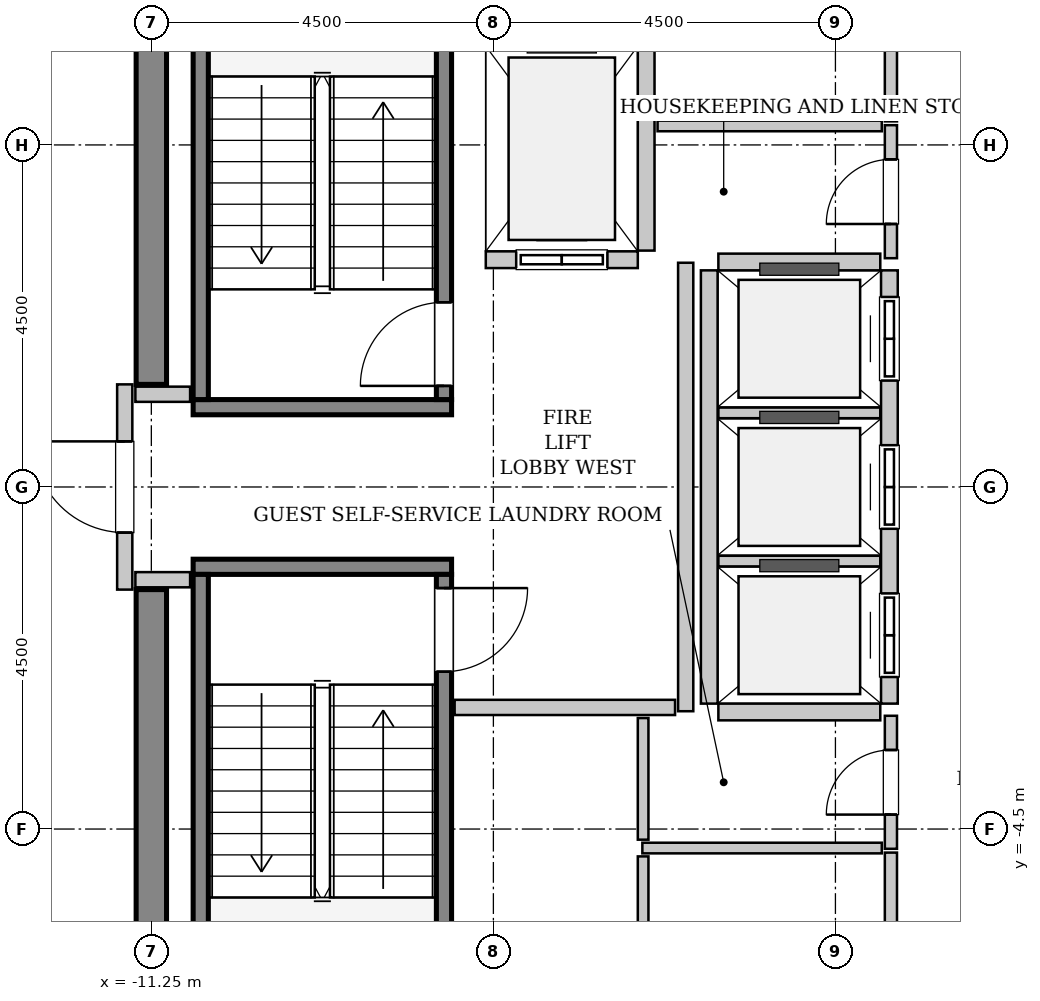
"""IFC4 building model, lengths in metres.
Left out: names, types, materials, properties, quantities, classifications, styles, units other than length and angle.
Written with IfcOpenShell. Run it as: python <this file> out.ifc"""

import sys

from ifc_helpers import new_model, si_unit, direction, frame, frame_2d, origin, place, context, subcontext, project, spatial, rectangle, extrude, source, transform, mapped, element, fill, save


model = new_model("IFC4")
c1 = context("Model", 3, precision=1e-05, world=origin(), true_north=direction((0.0, 1.0)))
c2 = subcontext(c1, "Body", "Model", "MODEL_VIEW")
j1 = project(units=[si_unit("LENGTHUNIT", "METRE"), si_unit("PLANEANGLEUNIT", "RADIAN")], contexts=[c1])
p1 = place(None, origin())
s1 = spatial("IfcSite", under=j1, at=p1, CompositionType="ELEMENT")
p2 = place(p1, origin())
s2 = spatial("IfcBuilding", under=s1, at=p2, CompositionType="ELEMENT")
p3 = place(p2, frame((0.0, 0.0, 330.0)))
s3 = spatial("IfcBuildingStorey", under=s2, at=p3, CompositionType="ELEMENT", Elevation=330.0)
m1 = source(origin(), c2, "Body", "SweptSolid", [
    extrude(rectangle(XDim=7.45, YDim=0.4, at=frame_2d((3.725, 0.0))), origin(), (0.0, 0.0, 1.0), 3.8),
])
for number, where, z_axis, x_axis in (
    (1, (-11.25, -8.8, 0.0), (0.0, 0.0, 1.0), (0.0, 1.0, 0.0)),
    (2, (-11.25, 1.35, 0.0), (0.0, 0.0, 1.0), (0.0, 1.0, 0.0)),
):
    element("IfcWall", number, at=place(p3, frame(where, z_axis=z_axis, x_axis=x_axis)), inside=s3, PredefinedType="SHEAR", context=c2, shape_type="MappedRepresentation", body=[
        mapped(m1, transform((0.0, 0.0, 0.0), x_axis=(1.0, 0.0, 0.0), y_axis=(0.0, 1.0, 0.0), z_axis=(0.0, 0.0, 1.0), scale=1.0)),
    ])
m2 = source(origin(), c2, "Body", "SweptSolid", [
    extrude(rectangle(XDim=3.4, YDim=0.2, at=frame_2d((1.7, 0.0))), origin(), (0.0, 0.0, 1.0), 3.8),
])
p4 = place(p3, frame((-7.3, 1.05, 0.0), z_axis=(0.0, 0.0, 1.0), x_axis=(-1.0, 0.0, 0.0)))
e3 = element("IfcWall", 3, at=p4, inside=s3, PredefinedType="SOLIDWALL", context=c2, shape_type="MappedRepresentation", body=[
    mapped(m2, transform((0.0, 0.0, 0.0), x_axis=(1.0, 0.0, 0.0), y_axis=(0.0, 1.0, 0.0), z_axis=(0.0, 0.0, 1.0), scale=1.0)),
])
m3 = source(origin(), c2, "Body", "SweptSolid", [
    extrude(rectangle(XDim=7.1, YDim=0.2, at=frame_2d((3.55, 0.0))), origin(), (0.0, 0.0, 1.0), 3.8),
])
p5 = place(p3, frame((-7.4, 1.15, 0.0), z_axis=(0.0, 0.0, 1.0), x_axis=(0.0, 1.0, 0.0)))
e4 = element("IfcWall", 4, at=p5, inside=s3, PredefinedType="SOLIDWALL", context=c2, shape_type="MappedRepresentation", body=[
    mapped(m3, transform((0.0, 0.0, 0.0), x_axis=(1.0, 0.0, 0.0), y_axis=(0.0, 1.0, 0.0), z_axis=(0.0, 0.0, 1.0), scale=1.0)),
])
p6 = place(p5, frame((0.18, 0.0, 0.0)))
e5 = element("IfcOpeningElement", 5, at=p6, cuts=e4, PredefinedType="OPENING", context=c2, shape_type="SweptSolid", body=[
    extrude(rectangle(XDim=1.1, YDim=2.15, at=frame_2d((0.55, 1.075))), frame((0.0, 0.11, 0.0), z_axis=(0.0, -1.0, 0.0), x_axis=(1.0, 0.0, 0.0)), (0.0, 0.0, 1.0), 0.22),
])
p7 = place(p3, frame((-10.6, 1.15, 0.0), z_axis=(0.0, 0.0, 1.0), x_axis=(0.0, 1.0, 0.0)))
e6 = element("IfcWall", 6, at=p7, inside=s3, PredefinedType="SOLIDWALL", context=c2, shape_type="MappedRepresentation", body=[
    mapped(m3, transform((0.0, 0.0, 0.0), x_axis=(1.0, 0.0, 0.0), y_axis=(0.0, 1.0, 0.0), z_axis=(0.0, 0.0, 1.0), scale=1.0)),
])
p8 = place(p3, frame((-10.7, -1.05, 0.0), z_axis=(0.0, 0.0, 1.0), x_axis=(1.0, 0.0, 0.0)))
e7 = element("IfcWall", 7, at=p8, inside=s3, PredefinedType="SOLIDWALL", context=c2, shape_type="MappedRepresentation", body=[
    mapped(m2, transform((0.0, 0.0, 0.0), x_axis=(1.0, 0.0, 0.0), y_axis=(0.0, 1.0, 0.0), z_axis=(0.0, 0.0, 1.0), scale=1.0)),
])
p9 = place(p3, frame((-10.6, -1.15, 0.0), z_axis=(0.0, 0.0, 1.0), x_axis=(0.0, -1.0, 0.0)))
e8 = element("IfcWall", 8, at=p9, inside=s3, PredefinedType="SOLIDWALL", context=c2, shape_type="MappedRepresentation", body=[
    mapped(m3, transform((0.0, 0.0, 0.0), x_axis=(1.0, 0.0, 0.0), y_axis=(0.0, 1.0, 0.0), z_axis=(0.0, 0.0, 1.0), scale=1.0)),
])
p10 = place(p3, frame((-7.4, -1.15, 0.0), z_axis=(0.0, 0.0, 1.0), x_axis=(0.0, -1.0, 0.0)))
e9 = element("IfcWall", 9, at=p10, inside=s3, PredefinedType="SOLIDWALL", context=c2, shape_type="MappedRepresentation", body=[
    mapped(m3, transform((0.0, 0.0, 0.0), x_axis=(1.0, 0.0, 0.0), y_axis=(0.0, 1.0, 0.0), z_axis=(0.0, 0.0, 1.0), scale=1.0)),
])
p11 = place(p10, frame((0.18, 0.0, 0.0)))
e10 = element("IfcOpeningElement", 10, at=p11, cuts=e9, PredefinedType="OPENING", context=c2, shape_type="SweptSolid", body=[
    extrude(rectangle(XDim=1.1, YDim=2.15, at=frame_2d((0.55, 1.075))), frame((0.0, 0.11, 0.0), z_axis=(0.0, -1.0, 0.0), x_axis=(1.0, 0.0, 0.0)), (0.0, 0.0, 1.0), 0.22),
])
m4 = source(origin(), c2, "Body", "SweptSolid", [
    extrude(rectangle(XDim=2.0, YDim=0.22, at=frame_2d((1.0, 0.0))), origin(), (0.0, 0.0, 1.0), 3.535),
])
p12 = place(p3, frame((-6.85, 2.99, 0.0), z_axis=(0.0, 0.0, 1.0), x_axis=(1.0, 0.0, 0.0)))
e11 = element("IfcWall", 11, at=p12, inside=s3, PredefinedType="SOLIDWALL", context=c2, shape_type="MappedRepresentation", body=[
    mapped(m4, transform((0.0, 0.0, 0.0), x_axis=(1.0, 0.0, 0.0), y_axis=(0.0, 1.0, 0.0), z_axis=(0.0, 0.0, 1.0), scale=1.0)),
])
p13 = place(p12, frame((0.4, 0.0, 0.0)))
e12 = element("IfcOpeningElement", 12, at=p13, cuts=e11, PredefinedType="OPENING", context=c2, shape_type="SweptSolid", body=[
    extrude(rectangle(XDim=1.2, YDim=2.2, at=frame_2d((0.6, 1.1))), frame((0.0, 0.12, 0.0), z_axis=(0.0, -1.0, 0.0), x_axis=(1.0, 0.0, 0.0)), (0.0, 0.0, 1.0), 0.24),
])
m5 = source(origin(), c2, "Body", "SweptSolid", [
    extrude(rectangle(XDim=2.68, YDim=0.22, at=frame_2d((1.34, 0.0))), origin(), (0.0, 0.0, 1.0), 3.535),
])
p14 = place(p3, frame((-4.74, 3.11, 0.0), z_axis=(0.0, 0.0, 1.0), x_axis=(0.0, 1.0, 0.0)))
e13 = element("IfcWall", 13, at=p14, inside=s3, PredefinedType="SOLIDWALL", context=c2, shape_type="MappedRepresentation", body=[
    mapped(m5, transform((0.0, 0.0, 0.0), x_axis=(1.0, 0.0, 0.0), y_axis=(0.0, 1.0, 0.0), z_axis=(0.0, 0.0, 1.0), scale=1.0)),
])
m6 = source(origin(), c2, "Body", "SweptSolid", [
    extrude(rectangle(XDim=5.7, YDim=0.22, at=frame_2d((2.85, 0.0))), origin(), (0.0, 0.0, 1.0), 3.535),
])
p15 = place(p3, frame((-1.54, -2.85, 0.0), z_axis=(0.0, 0.0, 1.0), x_axis=(0.0, 1.0, 0.0)))
e14 = element("IfcWall", 14, at=p15, inside=s3, PredefinedType="SOLIDWALL", context=c2, shape_type="MappedRepresentation", body=[
    mapped(m6, transform((0.0, 0.0, 0.0), x_axis=(1.0, 0.0, 0.0), y_axis=(0.0, 1.0, 0.0), z_axis=(0.0, 0.0, 1.0), scale=1.0)),
])
p16 = place(p15, frame((0.35, 0.0, 0.0)))
e15 = element("IfcOpeningElement", 15, at=p16, cuts=e14, PredefinedType="OPENING", context=c2, shape_type="SweptSolid", body=[
    extrude(rectangle(XDim=1.1, YDim=2.2, at=frame_2d((0.55, 1.1))), frame((0.0, 0.12, 0.0), z_axis=(0.0, -1.0, 0.0), x_axis=(1.0, 0.0, 0.0)), (0.0, 0.0, 1.0), 0.24),
])
p17 = place(p15, frame((2.3, 0.0, 0.0)))
e16 = element("IfcOpeningElement", 16, at=p17, cuts=e14, PredefinedType="OPENING", context=c2, shape_type="SweptSolid", body=[
    extrude(rectangle(XDim=1.1, YDim=2.2, at=frame_2d((0.55, 1.1))), frame((0.0, 0.12, 0.0), z_axis=(0.0, -1.0, 0.0), x_axis=(1.0, 0.0, 0.0)), (0.0, 0.0, 1.0), 0.24),
])
p18 = place(p15, frame((4.25, 0.0, 0.0)))
e17 = element("IfcOpeningElement", 17, at=p18, cuts=e14, PredefinedType="OPENING", context=c2, shape_type="SweptSolid", body=[
    extrude(rectangle(XDim=1.1, YDim=2.2, at=frame_2d((0.55, 1.1))), frame((0.0, 0.12, 0.0), z_axis=(0.0, -1.0, 0.0), x_axis=(1.0, 0.0, 0.0)), (0.0, 0.0, 1.0), 0.24),
])
p19 = place(p3, frame((-3.91, 2.85, 0.0), z_axis=(0.0, 0.0, 1.0), x_axis=(0.0, -1.0, 0.0)))
e18 = element("IfcWall", 18, at=p19, inside=s3, PredefinedType="SOLIDWALL", context=c2, shape_type="MappedRepresentation", body=[
    mapped(m6, transform((0.0, 0.0, 0.0), x_axis=(1.0, 0.0, 0.0), y_axis=(0.0, 1.0, 0.0), z_axis=(0.0, 0.0, 1.0), scale=1.0)),
])
m7 = source(origin(), c2, "Body", "SweptSolid", [
    extrude(rectangle(XDim=2.13, YDim=0.22, at=frame_2d((1.065, 0.0))), origin(), (0.0, 0.0, 1.0), 3.535),
])
p20 = place(p3, frame((-3.79, -2.96, 0.0), z_axis=(0.0, 0.0, 1.0), x_axis=(1.0, 0.0, 0.0)))
e19 = element("IfcWall", 19, at=p20, inside=s3, PredefinedType="SOLIDWALL", context=c2, shape_type="MappedRepresentation", body=[
    mapped(m7, transform((0.0, 0.0, 0.0), x_axis=(1.0, 0.0, 0.0), y_axis=(0.0, 1.0, 0.0), z_axis=(0.0, 0.0, 1.0), scale=1.0)),
])
m8 = source(origin(), c2, "Body", "SweptSolid", [
    extrude(rectangle(XDim=2.13, YDim=0.14, at=frame_2d((1.065, 0.0))), origin(), (0.0, 0.0, 1.0), 3.535),
])
for number, where, z_axis, x_axis in (
    (20, (-3.79, -0.975, 0.0), (0.0, 0.0, 1.0), (1.0, 0.0, 0.0)),
    (21, (-3.79, 0.975, 0.0), (0.0, 0.0, 1.0), (1.0, 0.0, 0.0)),
):
    element("IfcWall", number, at=place(p3, frame(where, z_axis=z_axis, x_axis=x_axis)), inside=s3, PredefinedType="PARTITIONING", context=c2, shape_type="MappedRepresentation", body=[
        mapped(m8, transform((0.0, 0.0, 0.0), x_axis=(1.0, 0.0, 0.0), y_axis=(0.0, 1.0, 0.0), z_axis=(0.0, 0.0, 1.0), scale=1.0)),
    ])
p21 = place(p3, frame((-1.66, 2.96, 0.0), z_axis=(0.0, 0.0, 1.0), x_axis=(-1.0, 0.0, 0.0)))
e22 = element("IfcWall", 22, at=p21, inside=s3, PredefinedType="SOLIDWALL", context=c2, shape_type="MappedRepresentation", body=[
    mapped(m7, transform((0.0, 0.0, 0.0), x_axis=(1.0, 0.0, 0.0), y_axis=(0.0, 1.0, 0.0), z_axis=(0.0, 0.0, 1.0), scale=1.0)),
])
m9 = source(origin(), c2, "Body", "SweptSolid", [
    extrude(rectangle(XDim=2.7, YDim=0.2, at=frame_2d((1.35, 0.0))), origin(), (0.0, 0.0, 1.0), 2.625),
])
p22 = place(p3, frame((-11.6, -1.35, 0.0), z_axis=(0.0, 0.0, 1.0), x_axis=(0.0, 1.0, 0.0)))
e23 = element("IfcWall", 23, at=p22, inside=s3, PredefinedType="PARTITIONING", context=c2, shape_type="MappedRepresentation", body=[
    mapped(m9, transform((0.0, 0.0, 0.0), x_axis=(1.0, 0.0, 0.0), y_axis=(0.0, 1.0, 0.0), z_axis=(0.0, 0.0, 1.0), scale=1.0)),
])
p23 = place(p22, frame((0.75, 0.0, 0.0)))
e24 = element("IfcOpeningElement", 24, at=p23, cuts=e23, PredefinedType="OPENING", context=c2, shape_type="SweptSolid", body=[
    extrude(rectangle(XDim=1.2, YDim=2.15, at=frame_2d((0.6, 1.075))), frame((0.0, 0.11, 0.0), z_axis=(0.0, -1.0, 0.0), x_axis=(1.0, 0.0, 0.0)), (0.0, 0.0, 1.0), 0.22),
])
m10 = source(origin(), c2, "Body", "SweptSolid", [
    extrude(rectangle(XDim=5.9, YDim=0.2, at=frame_2d((2.95, 0.0))), origin(), (0.0, 0.0, 1.0), 3.535),
])
p24 = place(p3, frame((-4.22, -2.95, 0.0), z_axis=(0.0, 0.0, 1.0), x_axis=(0.0, 1.0, 0.0)))
e25 = element("IfcWall", 25, at=p24, inside=s3, PredefinedType="PARTITIONING", context=c2, shape_type="MappedRepresentation", body=[
    mapped(m10, transform((0.0, 0.0, 0.0), x_axis=(1.0, 0.0, 0.0), y_axis=(0.0, 1.0, 0.0), z_axis=(0.0, 0.0, 1.0), scale=1.0)),
])
m11 = source(origin(), c2, "Body", "SweptSolid", [
    extrude(rectangle(XDim=2.9, YDim=0.2, at=frame_2d((1.45, 0.0))), origin(), (0.0, 0.0, 1.0), 3.535),
])
p25 = place(p3, frame((-7.26, -2.9, 0.0), z_axis=(0.0, 0.0, 1.0), x_axis=(1.0, 0.0, 0.0)))
e26 = element("IfcWall", 26, at=p25, inside=s3, PredefinedType="PARTITIONING", context=c2, shape_type="MappedRepresentation", body=[
    mapped(m11, transform((0.0, 0.0, 0.0), x_axis=(1.0, 0.0, 0.0), y_axis=(0.0, 1.0, 0.0), z_axis=(0.0, 0.0, 1.0), scale=1.0)),
])
m12 = source(origin(), c2, "Body", "SweptSolid", [
    extrude(rectangle(XDim=0.72, YDim=0.2, at=frame_2d((0.36, 0.0))), origin(), (0.0, 0.0, 1.0), 3.535),
])
for number, where, z_axis, x_axis in (
    (27, (-11.46, 1.22, 0.0), (0.0, 0.0, 1.0), (1.0, 0.0, 0.0)),
    (28, (-11.46, -1.22, 0.0), (0.0, 0.0, 1.0), (1.0, 0.0, 0.0)),
):
    element("IfcWall", number, at=place(p3, frame(where, z_axis=z_axis, x_axis=x_axis)), inside=s3, PredefinedType="PARTITIONING", context=c2, shape_type="MappedRepresentation", body=[
        mapped(m12, transform((0.0, 0.0, 0.0), x_axis=(1.0, 0.0, 0.0), y_axis=(0.0, 1.0, 0.0), z_axis=(0.0, 0.0, 1.0), scale=1.0)),
    ])
m13 = source(origin(), c2, "Body", "SweptSolid", [
    extrude(rectangle(XDim=1.75, YDim=0.16, at=frame_2d((0.875, 0.0))), origin(), (0.0, 0.0, 1.0), 3.535),
])
p26 = place(p3, frame((-1.52, 3.01, 0.0), z_axis=(0.0, 0.0, 1.0), x_axis=(0.0, 1.0, 0.0)))
e29 = element("IfcWall", 29, at=p26, inside=s3, PredefinedType="PARTITIONING", context=c2, shape_type="MappedRepresentation", body=[
    mapped(m13, transform((0.0, 0.0, 0.0), x_axis=(1.0, 0.0, 0.0), y_axis=(0.0, 1.0, 0.0), z_axis=(0.0, 0.0, 1.0), scale=1.0)),
])
p27 = place(p26, frame((0.45, 0.0, 0.0)))
e30 = element("IfcOpeningElement", 30, at=p27, cuts=e29, PredefinedType="OPENING", context=c2, shape_type="SweptSolid", body=[
    extrude(rectangle(XDim=0.85, YDim=2.1, at=frame_2d((0.425, 1.05))), frame((0.0, 0.09, 0.0), z_axis=(0.0, -1.0, 0.0), x_axis=(1.0, 0.0, 0.0)), (0.0, 0.0, 1.0), 0.18),
])
m14 = source(origin(), c2, "Body", "SweptSolid", [
    extrude(rectangle(XDim=2.95, YDim=0.14, at=frame_2d((1.475, 0.0))), origin(), (0.0, 0.0, 1.0), 3.535),
])
p28 = place(p3, frame((-4.59, 4.75, 0.0), z_axis=(0.0, 0.0, 1.0), x_axis=(1.0, 0.0, 0.0)))
e31 = element("IfcWall", 31, at=p28, inside=s3, PredefinedType="PARTITIONING", context=c2, shape_type="MappedRepresentation", body=[
    mapped(m14, transform((0.0, 0.0, 0.0), x_axis=(1.0, 0.0, 0.0), y_axis=(0.0, 1.0, 0.0), z_axis=(0.0, 0.0, 1.0), scale=1.0)),
])
m15 = source(origin(), c2, "Body", "SweptSolid", [
    extrude(rectangle(XDim=3.68, YDim=0.16, at=frame_2d((1.84, 0.0))), origin(), (0.0, 0.0, 1.0), 3.535),
])
p29 = place(p3, frame((-1.52, 4.81, 0.0), z_axis=(0.0, 0.0, 1.0), x_axis=(0.0, 1.0, 0.0)))
e32 = element("IfcWall", 32, at=p29, inside=s3, PredefinedType="PARTITIONING", context=c2, shape_type="MappedRepresentation", body=[
    mapped(m15, transform((0.0, 0.0, 0.0), x_axis=(1.0, 0.0, 0.0), y_axis=(0.0, 1.0, 0.0), z_axis=(0.0, 0.0, 1.0), scale=1.0)),
])
p30 = place(p29, frame((1.415, 0.0, 0.0)))
e33 = element("IfcOpeningElement", 33, at=p30, cuts=e32, PredefinedType="OPENING", context=c2, shape_type="SweptSolid", body=[
    extrude(rectangle(XDim=0.85, YDim=2.1, at=frame_2d((0.425, 1.05))), frame((0.0, 0.09, 0.0), z_axis=(0.0, -1.0, 0.0), x_axis=(1.0, 0.0, 0.0)), (0.0, 0.0, 1.0), 0.18),
])
p31 = place(p3, frame((-1.52, -4.76, 0.0), z_axis=(0.0, 0.0, 1.0), x_axis=(0.0, 1.0, 0.0)))
e34 = element("IfcWall", 34, at=p31, inside=s3, PredefinedType="PARTITIONING", context=c2, shape_type="MappedRepresentation", body=[
    mapped(m13, transform((0.0, 0.0, 0.0), x_axis=(1.0, 0.0, 0.0), y_axis=(0.0, 1.0, 0.0), z_axis=(0.0, 0.0, 1.0), scale=1.0)),
])
p32 = place(p31, frame((0.45, 0.0, 0.0)))
e35 = element("IfcOpeningElement", 35, at=p32, cuts=e34, PredefinedType="OPENING", context=c2, shape_type="SweptSolid", body=[
    extrude(rectangle(XDim=0.85, YDim=2.1, at=frame_2d((0.425, 1.05))), frame((0.0, 0.09, 0.0), z_axis=(0.0, -1.0, 0.0), x_axis=(1.0, 0.0, 0.0)), (0.0, 0.0, 1.0), 0.18),
])
m16 = source(origin(), c2, "Body", "SweptSolid", [
    extrude(rectangle(XDim=3.15, YDim=0.14, at=frame_2d((1.575, 0.0))), origin(), (0.0, 0.0, 1.0), 3.535),
])
p33 = place(p3, frame((-4.79, -4.75, 0.0), z_axis=(0.0, 0.0, 1.0), x_axis=(1.0, 0.0, 0.0)))
e36 = element("IfcWall", 36, at=p33, inside=s3, PredefinedType="PARTITIONING", context=c2, shape_type="MappedRepresentation", body=[
    mapped(m16, transform((0.0, 0.0, 0.0), x_axis=(1.0, 0.0, 0.0), y_axis=(0.0, 1.0, 0.0), z_axis=(0.0, 0.0, 1.0), scale=1.0)),
])
m17 = source(origin(), c2, "Body", "SweptSolid", [
    extrude(rectangle(XDim=1.6, YDim=0.14, at=frame_2d((0.8, 0.0))), origin(), (0.0, 0.0, 1.0), 3.535),
])
p34 = place(p3, frame((-4.78, -4.64, 0.0), z_axis=(0.0, 0.0, 1.0), x_axis=(0.0, 1.0, 0.0)))
e37 = element("IfcWall", 37, at=p34, inside=s3, PredefinedType="PARTITIONING", context=c2, shape_type="MappedRepresentation", body=[
    mapped(m17, transform((0.0, 0.0, 0.0), x_axis=(1.0, 0.0, 0.0), y_axis=(0.0, 1.0, 0.0), z_axis=(0.0, 0.0, 1.0), scale=1.0)),
])
p35 = place(p3, frame((-1.52, -8.49, 0.0), z_axis=(0.0, 0.0, 1.0), x_axis=(0.0, 1.0, 0.0)))
e38 = element("IfcWall", 38, at=p35, inside=s3, PredefinedType="PARTITIONING", context=c2, shape_type="MappedRepresentation", body=[
    mapped(m15, transform((0.0, 0.0, 0.0), x_axis=(1.0, 0.0, 0.0), y_axis=(0.0, 1.0, 0.0), z_axis=(0.0, 0.0, 1.0), scale=1.0)),
])
p36 = place(p35, frame((1.415, 0.0, 0.0)))
e39 = element("IfcOpeningElement", 39, at=p36, cuts=e38, PredefinedType="OPENING", context=c2, shape_type="SweptSolid", body=[
    extrude(rectangle(XDim=0.85, YDim=2.1, at=frame_2d((0.425, 1.05))), frame((0.0, 0.09, 0.0), z_axis=(0.0, -1.0, 0.0), x_axis=(1.0, 0.0, 0.0)), (0.0, 0.0, 1.0), 0.18),
])
m18 = source(origin(), c2, "Body", "SweptSolid", [
    extrude(rectangle(XDim=3.63, YDim=0.14, at=frame_2d((1.815, 0.0))), origin(), (0.0, 0.0, 1.0), 3.535),
])
p37 = place(p3, frame((-4.78, -8.49, 0.0), z_axis=(0.0, 0.0, 1.0), x_axis=(0.0, 1.0, 0.0)))
e40 = element("IfcWall", 40, at=p37, inside=s3, PredefinedType="PARTITIONING", context=c2, shape_type="MappedRepresentation", body=[
    mapped(m18, transform((0.0, 0.0, 0.0), x_axis=(1.0, 0.0, 0.0), y_axis=(0.0, 1.0, 0.0), z_axis=(0.0, 0.0, 1.0), scale=1.0)),
])
m19 = source(origin(), c2, "Body", "SweptSolid", [
    extrude(rectangle(XDim=1.1, YDim=2.15, at=frame_2d((0.55, 1.075))), frame((0.0, 0.025, 0.0), z_axis=(0.0, -1.0, 0.0), x_axis=(1.0, 0.0, 0.0)), (0.0, 0.0, 1.0), 0.05),
])
p38 = place(p6, origin())
e41 = element("IfcDoor", 41, at=p38, inside=s3, OperationType="SINGLE_SWING_LEFT", PredefinedType="DOOR", context=c2, shape_type="MappedRepresentation", body=[
    mapped(m19, transform((0.0, 0.0, 0.0), x_axis=(1.0, 0.0, 0.0), y_axis=(0.0, 1.0, 0.0), z_axis=(0.0, 0.0, 1.0), scale=1.0)),
])
fill(e5, e41)
p39 = place(p11, origin())
e42 = element("IfcDoor", 42, at=p39, inside=s3, OperationType="SINGLE_SWING_LEFT", PredefinedType="DOOR", context=c2, shape_type="MappedRepresentation", body=[
    mapped(m19, transform((0.0, 0.0, 0.0), x_axis=(1.0, 0.0, 0.0), y_axis=(0.0, 1.0, 0.0), z_axis=(0.0, 0.0, 1.0), scale=1.0)),
])
fill(e10, e42)
m20 = source(origin(), c2, "Body", "SweptSolid", [
    extrude(rectangle(XDim=1.2, YDim=2.2, at=frame_2d((0.6, 1.1))), frame((0.0, 0.025, 0.0), z_axis=(0.0, -1.0, 0.0), x_axis=(1.0, 0.0, 0.0)), (0.0, 0.0, 1.0), 0.05),
])
p40 = place(p13, origin())
e43 = element("IfcDoor", 43, at=p40, inside=s3, OperationType="SLIDING_TO_LEFT", PredefinedType="DOOR", context=c2, shape_type="MappedRepresentation", body=[
    mapped(m20, transform((0.0, 0.0, 0.0), x_axis=(1.0, 0.0, 0.0), y_axis=(0.0, 1.0, 0.0), z_axis=(0.0, 0.0, 1.0), scale=1.0)),
])
fill(e12, e43)
m21 = source(origin(), c2, "Body", "SweptSolid", [
    extrude(rectangle(XDim=1.1, YDim=2.2, at=frame_2d((0.55, 1.1))), frame((0.0, 0.025, 0.0), z_axis=(0.0, -1.0, 0.0), x_axis=(1.0, 0.0, 0.0)), (0.0, 0.0, 1.0), 0.05),
])
p41 = place(p16, origin())
e44 = element("IfcDoor", 44, at=p41, inside=s3, OperationType="DOUBLE_DOOR_SLIDING", PredefinedType="DOOR", context=c2, shape_type="MappedRepresentation", body=[
    mapped(m21, transform((0.0, 0.0, 0.0), x_axis=(1.0, 0.0, 0.0), y_axis=(0.0, 1.0, 0.0), z_axis=(0.0, 0.0, 1.0), scale=1.0)),
])
fill(e15, e44)
p42 = place(p17, origin())
e45 = element("IfcDoor", 45, at=p42, inside=s3, OperationType="DOUBLE_DOOR_SLIDING", PredefinedType="DOOR", context=c2, shape_type="MappedRepresentation", body=[
    mapped(m21, transform((0.0, 0.0, 0.0), x_axis=(1.0, 0.0, 0.0), y_axis=(0.0, 1.0, 0.0), z_axis=(0.0, 0.0, 1.0), scale=1.0)),
])
fill(e16, e45)
p43 = place(p18, origin())
e46 = element("IfcDoor", 46, at=p43, inside=s3, OperationType="DOUBLE_DOOR_SLIDING", PredefinedType="DOOR", context=c2, shape_type="MappedRepresentation", body=[
    mapped(m21, transform((0.0, 0.0, 0.0), x_axis=(1.0, 0.0, 0.0), y_axis=(0.0, 1.0, 0.0), z_axis=(0.0, 0.0, 1.0), scale=1.0)),
])
fill(e17, e46)
m22 = source(origin(), c2, "Body", "SweptSolid", [
    extrude(rectangle(XDim=1.2, YDim=2.15, at=frame_2d((0.6, 1.075))), frame((0.0, 0.025, 0.0), z_axis=(0.0, -1.0, 0.0), x_axis=(1.0, 0.0, 0.0)), (0.0, 0.0, 1.0), 0.05),
])
p44 = place(p23, origin())
e47 = element("IfcDoor", 47, at=p44, inside=s3, OperationType="SINGLE_SWING_RIGHT", PredefinedType="DOOR", context=c2, shape_type="MappedRepresentation", body=[
    mapped(m22, transform((0.0, 0.0, 0.0), x_axis=(1.0, 0.0, 0.0), y_axis=(0.0, 1.0, 0.0), z_axis=(0.0, 0.0, 1.0), scale=1.0)),
])
fill(e24, e47)
m23 = source(origin(), c2, "Body", "SweptSolid", [
    extrude(rectangle(XDim=0.85, YDim=2.1, at=frame_2d((0.425, 1.05))), frame((0.0, 0.025, 0.0), z_axis=(0.0, -1.0, 0.0), x_axis=(1.0, 0.0, 0.0)), (0.0, 0.0, 1.0), 0.05),
])
p45 = place(p27, origin())
e48 = element("IfcDoor", 48, at=p45, inside=s3, OperationType="SINGLE_SWING_LEFT", PredefinedType="DOOR", context=c2, shape_type="MappedRepresentation", body=[
    mapped(m23, transform((0.0, 0.0, 0.0), x_axis=(1.0, 0.0, 0.0), y_axis=(0.0, 1.0, 0.0), z_axis=(0.0, 0.0, 1.0), scale=1.0)),
])
fill(e30, e48)
p46 = place(p32, origin())
e49 = element("IfcDoor", 49, at=p46, inside=s3, OperationType="SINGLE_SWING_LEFT", PredefinedType="DOOR", context=c2, shape_type="MappedRepresentation", body=[
    mapped(m23, transform((0.0, 0.0, 0.0), x_axis=(1.0, 0.0, 0.0), y_axis=(0.0, 1.0, 0.0), z_axis=(0.0, 0.0, 1.0), scale=1.0)),
])
fill(e35, e49)
save(model, sys.argv[1])
